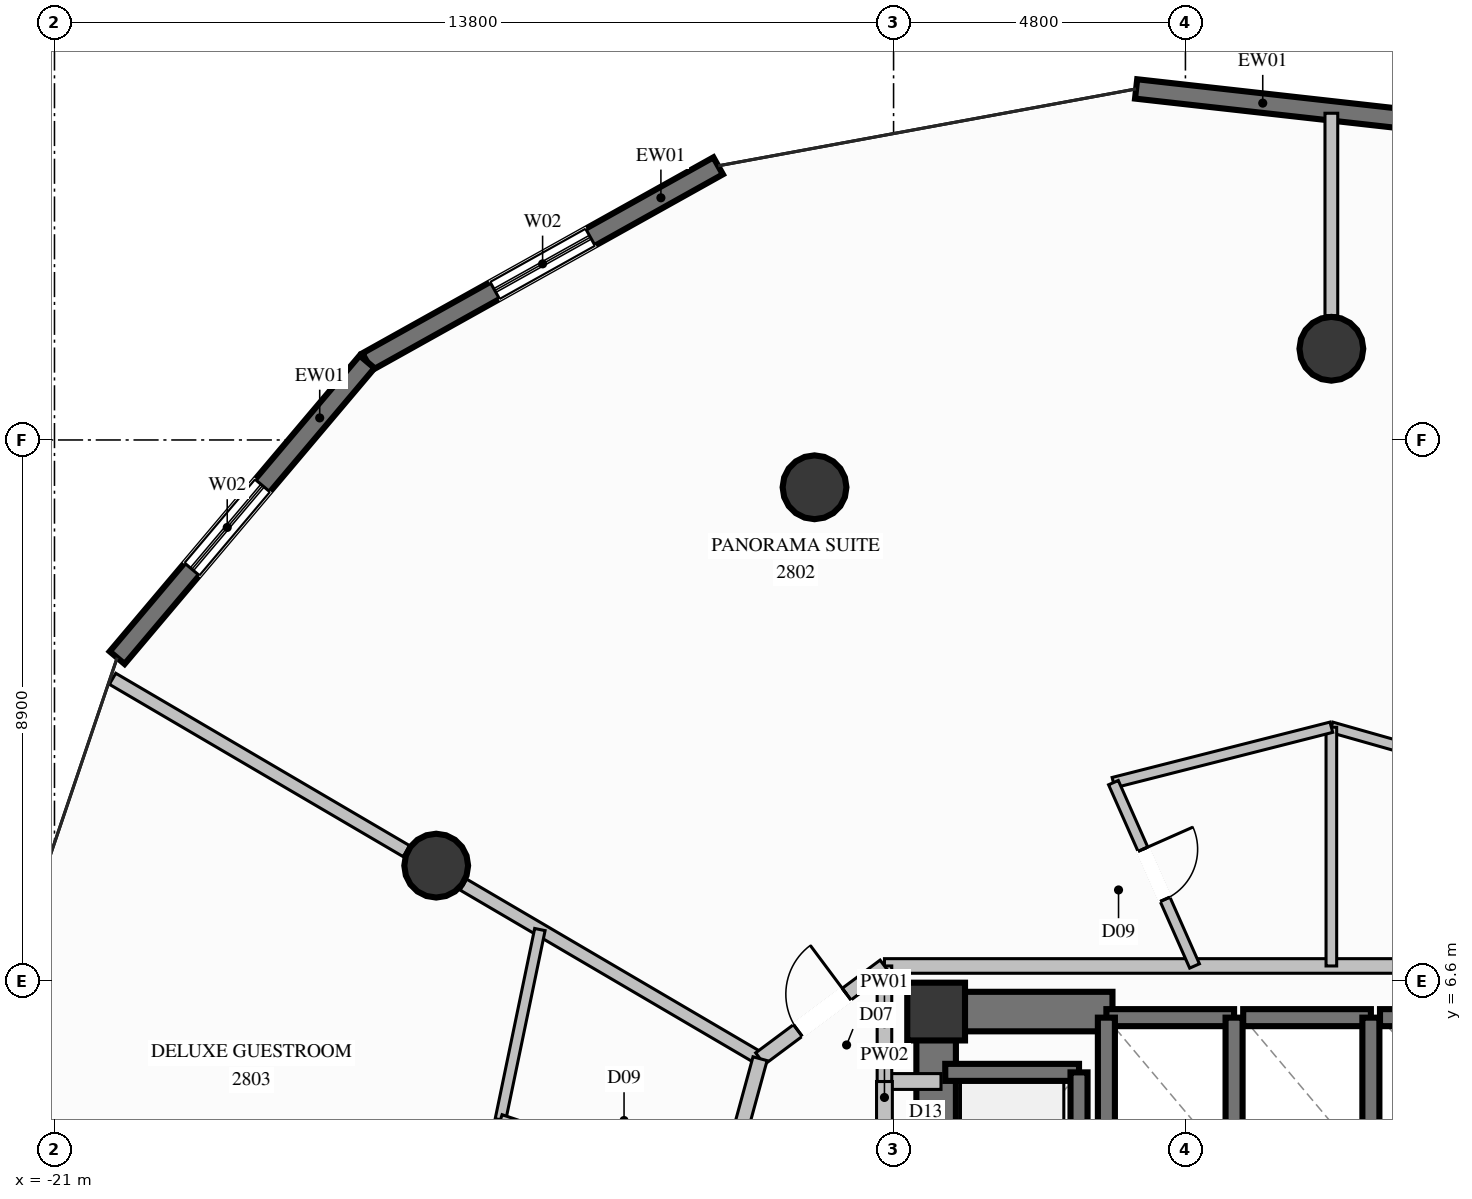
"""IFC4 building model, lengths in metres.
Left out: names, types, materials, properties, quantities, classifications, styles, units other than length and angle.
Written with IfcOpenShell. Run it as: python <this file> out.ifc"""

import sys

from ifc_helpers import new_model, si_unit, direction, frame, frame_2d, origin, origin_2d, place, context, subcontext, project, spatial, rectangle, circle, extrude, element, fill, save


model = new_model("IFC4")
c1 = context("Model", 3, precision=1e-05, world=origin(), true_north=direction((0.0, 1.0)))
c2 = subcontext(c1, "Body", "Model", "MODEL_VIEW")
j1 = project(units=[si_unit("LENGTHUNIT", "METRE"), si_unit("PLANEANGLEUNIT", "RADIAN")], contexts=[c1])
p1 = place(None, origin())
s1 = spatial("IfcSite", under=j1, at=p1, CompositionType="ELEMENT")
p2 = place(p1, origin())
s2 = spatial("IfcBuilding", under=s1, at=p2, CompositionType="ELEMENT")
p3 = place(p2, frame((0.0, 0.0, 106.2)))
s3 = spatial("IfcBuildingStorey", under=s2, at=p3, CompositionType="ELEMENT", Elevation=106.2)
p4 = place(p3, frame((-6.5, 6.1, 0.0), z_axis=(0.0, 0.0, 1.0), x_axis=(1.0, 0.0, 0.0)))
e1 = element("IfcColumn", 1, at=p4, inside=s3, PredefinedType="COLUMN", context=c2, shape_type="SweptSolid", body=[
    extrude(rectangle(XDim=0.95, YDim=0.95, at=origin_2d()), origin(), (0.0, 0.0, 1.0), 3.6),
])
p5 = place(p3, frame((-6.175, 6.1, 0.0), z_axis=(0.0, 0.0, 1.0), x_axis=(1.0, 0.0, 0.0)))
e2 = element("IfcWall", 2, at=p5, inside=s3, PredefinedType="SHEAR", context=c2, shape_type="SweptSolid", body=[
    extrude(rectangle(XDim=2.575, YDim=0.65, at=frame_2d((1.288, 0.0))), origin(), (0.0, 0.0, 1.0), 3.6),
])
p6 = place(p3, frame((-6.5, 2.35, 0.0), z_axis=(0.0, 0.0, 1.0), x_axis=(0.0, 1.0, 0.0)))
e3 = element("IfcWall", 3, at=p6, inside=s3, PredefinedType="SHEAR", context=c2, shape_type="SweptSolid", body=[
    extrude(rectangle(XDim=4.075, YDim=0.65, at=frame_2d((2.038, 0.0))), origin(), (0.0, 0.0, 1.0), 3.6),
])
for number, where, z_axis, x_axis in (
    (4, (0.0, 17.0, 0.0), (0.0, 0.0, 1.0), (1.0, 0.0, 0.0)),
    (5, (-8.5, 14.722, 0.0), (0.0, 0.0, 1.0), (1.0, 0.0, 0.0)),
    (6, (-14.722, 8.5, 0.0), (0.0, 0.0, 1.0), (1.0, 0.0, 0.0)),
):
    element("IfcColumn", number, at=place(p3, frame(where, z_axis=z_axis, x_axis=x_axis)), inside=s3, PredefinedType="COLUMN", context=c2, shape_type="SweptSolid", body=[
        extrude(circle(Radius=0.525, at=origin_2d()), origin(), (0.0, 0.0, 1.0), 3.6),
    ])
p7 = place(p3, frame((-3.211, 21.273, 0.0), z_axis=(0.0, 0.0, 1.0), x_axis=(0.993784044115, -0.111325081016, 0.0)))
e7 = element("IfcWall", 7, at=p7, inside=s3, PredefinedType="SOLIDWALL", context=c2, shape_type="SweptSolid", body=[
    extrude(rectangle(XDim=7.347, YDim=0.32, at=frame_2d((3.673, 0.0))), origin(), (0.0, 0.0, 1.0), 3.35),
])
p8 = place(p7, frame((4.441, 0.0, 0.35)))
e8 = element("IfcOpeningElement", 8, at=p8, cuts=e7, PredefinedType="OPENING", context=c2, shape_type="SweptSolid", body=[
    extrude(rectangle(XDim=1.8, YDim=2.6, at=frame_2d((0.9, 1.3))), frame((0.0, 0.17, 0.0), z_axis=(0.0, -1.0, 0.0), x_axis=(1.0, 0.0, 0.0)), (0.0, 0.0, 1.0), 0.34),
])
p9 = place(p3, frame((-15.859, 16.785, 0.0), z_axis=(0.0, 0.0, 1.0), x_axis=(0.873166276034, 0.487422459882, 0.0)))
e9 = element("IfcWall", 9, at=p9, inside=s3, PredefinedType="SOLIDWALL", context=c2, shape_type="SweptSolid", body=[
    extrude(rectangle(XDim=6.613, YDim=0.32, at=frame_2d((3.306, 0.0))), origin(), (0.0, 0.0, 1.0), 3.35),
])
p10 = place(p9, frame((2.406, 0.0, 0.35)))
e10 = element("IfcOpeningElement", 10, at=p10, cuts=e9, PredefinedType="OPENING", context=c2, shape_type="SweptSolid", body=[
    extrude(rectangle(XDim=1.8, YDim=2.6, at=frame_2d((0.9, 1.3))), frame((0.0, 0.17, 0.0), z_axis=(0.0, -1.0, 0.0), x_axis=(1.0, 0.0, 0.0)), (0.0, 0.0, 1.0), 0.34),
])
p11 = place(p3, frame((-19.969, 11.919, 0.0), z_axis=(0.0, 0.0, 1.0), x_axis=(0.645278763483, 0.763947195425, 0.0)))
e11 = element("IfcWall", 11, at=p11, inside=s3, PredefinedType="SOLIDWALL", context=c2, shape_type="SweptSolid", body=[
    extrude(rectangle(XDim=6.369, YDim=0.32, at=frame_2d((3.185, 0.0))), origin(), (0.0, 0.0, 1.0), 3.35),
])
p12 = place(p11, frame((1.905, 0.0, 0.35)))
e12 = element("IfcOpeningElement", 12, at=p12, cuts=e11, PredefinedType="OPENING", context=c2, shape_type="SweptSolid", body=[
    extrude(rectangle(XDim=1.8, YDim=2.6, at=frame_2d((0.9, 1.3))), frame((0.0, 0.17, 0.0), z_axis=(0.0, -1.0, 0.0), x_axis=(1.0, 0.0, 0.0)), (0.0, 0.0, 1.0), 0.34),
])
p13 = place(p3, frame((-1.6, 6.0, 0.0), z_axis=(0.0, 0.0, 1.0), x_axis=(-1.0, 0.0, 0.0)))
e13 = element("IfcWall", 13, at=p13, inside=s3, PredefinedType="SOLIDWALL", context=c2, shape_type="SweptSolid", body=[
    extrude(rectangle(XDim=2.1, YDim=0.28, at=frame_2d((1.05, 0.0))), origin(), (0.0, 0.0, 1.0), 3.35),
])
for number, where, z_axis, x_axis in (
    (14, (-3.7, 6.0, 0.0), (0.0, 0.0, 1.0), (0.0, -1.0, 0.0)),
    (15, (-1.6, 3.5, 0.0), (0.0, 0.0, 1.0), (0.0, 1.0, 0.0)),
):
    element("IfcWall", number, at=place(p3, frame(where, z_axis=z_axis, x_axis=x_axis)), inside=s3, PredefinedType="SOLIDWALL", context=c2, shape_type="SweptSolid", body=[
        extrude(rectangle(XDim=2.5, YDim=0.28, at=frame_2d((1.25, 0.0))), origin(), (0.0, 0.0, 1.0), 3.35),
    ])
p14 = place(p3, frame((0.65, 6.0, 0.0), z_axis=(0.0, 0.0, 1.0), x_axis=(-1.0, 0.0, 0.0)))
e16 = element("IfcWall", 16, at=p14, inside=s3, PredefinedType="SOLIDWALL", context=c2, shape_type="SweptSolid", body=[
    extrude(rectangle(XDim=2.1, YDim=0.28, at=frame_2d((1.05, 0.0))), origin(), (0.0, 0.0, 1.0), 3.35),
])
p15 = place(p3, frame((0.65, 3.5, 0.0), z_axis=(0.0, 0.0, 1.0), x_axis=(0.0, 1.0, 0.0)))
e17 = element("IfcWall", 17, at=p15, inside=s3, PredefinedType="SOLIDWALL", context=c2, shape_type="SweptSolid", body=[
    extrude(rectangle(XDim=2.5, YDim=0.28, at=frame_2d((1.25, 0.0))), origin(), (0.0, 0.0, 1.0), 3.35),
])
p16 = place(p3, frame((3.0, 6.0, 0.0), z_axis=(0.0, 0.0, 1.0), x_axis=(-1.0, 0.0, 0.0)))
e18 = element("IfcWall", 18, at=p16, inside=s3, PredefinedType="SOLIDWALL", context=c2, shape_type="SweptSolid", body=[
    extrude(rectangle(XDim=2.2, YDim=0.28, at=frame_2d((1.1, 0.0))), origin(), (0.0, 0.0, 1.0), 3.35),
])
p17 = place(p3, frame((-4.15, 5.1, 0.0), z_axis=(0.0, 0.0, 1.0), x_axis=(-1.0, 0.0, 0.0)))
e19 = element("IfcWall", 19, at=p17, inside=s3, PredefinedType="SOLIDWALL", context=c2, shape_type="SweptSolid", body=[
    extrude(rectangle(XDim=2.2, YDim=0.28, at=frame_2d((1.1, 0.0))), origin(), (0.0, 0.0, 1.0), 3.35),
])
p18 = place(p3, frame((-4.15, 2.4, 0.0), z_axis=(0.0, 0.0, 1.0), x_axis=(0.0, 1.0, 0.0)))
e20 = element("IfcWall", 20, at=p18, inside=s3, PredefinedType="SOLIDWALL", context=c2, shape_type="SweptSolid", body=[
    extrude(rectangle(XDim=2.7, YDim=0.28, at=frame_2d((1.35, 0.0))), origin(), (0.0, 0.0, 1.0), 3.35),
])
p19 = place(p3, frame((-7.35, 4.95, 0.0), z_axis=(0.0, 0.0, 1.0), x_axis=(1.0, 0.0, 0.0)))
e21 = element("IfcWall", 21, at=p19, inside=s3, PredefinedType="PARTITIONING", context=c2, shape_type="SweptSolid", body=[
    extrude(rectangle(XDim=0.93, YDim=0.26, at=frame_2d((0.465, 0.0))), origin(), (0.0, 0.0, 1.0), 3.35),
])
p20 = place(p3, frame((-7.35, 2.55, 0.0), z_axis=(0.0, 0.0, 1.0), x_axis=(0.0, 1.0, 0.0)))
e22 = element("IfcWall", 22, at=p20, inside=s3, PredefinedType="PARTITIONING", context=c2, shape_type="SweptSolid", body=[
    extrude(rectangle(XDim=2.4, YDim=0.26, at=frame_2d((1.2, 0.0))), origin(), (0.0, 0.0, 1.0), 2.435),
])
p21 = place(p20, frame((0.775, 0.0, 0.0)))
e23 = element("IfcOpeningElement", 23, at=p21, cuts=e22, PredefinedType="OPENING", context=c2, shape_type="SweptSolid", body=[
    extrude(rectangle(XDim=0.85, YDim=2.05, at=frame_2d((0.425, 1.025))), frame((0.0, 0.14, 0.0), z_axis=(0.0, -1.0, 0.0), x_axis=(1.0, 0.0, 0.0)), (0.0, 0.0, 1.0), 0.28),
])
p22 = place(p3, frame((-7.35, 6.85, 0.0), z_axis=(0.0, 0.0, 1.0), x_axis=(1.0, 0.0, 0.0)))
e24 = element("IfcWall", 24, at=p22, inside=s3, PredefinedType="PARTITIONING", context=c2, shape_type="SweptSolid", body=[
    extrude(rectangle(XDim=14.7, YDim=0.24, at=frame_2d((7.35, 0.0))), origin(), (0.0, 0.0, 1.0), 2.435),
])
p23 = place(p3, frame((-7.35, 4.95, 0.0), z_axis=(0.0, 0.0, 1.0), x_axis=(0.0, 1.0, 0.0)))
e25 = element("IfcWall", 25, at=p23, inside=s3, PredefinedType="PARTITIONING", context=c2, shape_type="SweptSolid", body=[
    extrude(rectangle(XDim=1.9, YDim=0.24, at=frame_2d((0.95, 0.0))), origin(), (0.0, 0.0, 1.0), 2.435),
])
p24 = place(p3, frame((-9.396, 5.325, 0.0), z_axis=(0.0, 0.0, 1.0), x_axis=(-0.862467386777, 0.50611264235, 0.0)))
e26 = element("IfcWall", 26, at=p24, inside=s3, PredefinedType="PARTITIONING", context=c2, shape_type="SweptSolid", body=[
    extrude(rectangle(XDim=5.657, YDim=0.21, at=frame_2d((2.829, 0.0))), origin(), (0.0, 0.0, 1.0), 2.719),
])
p25 = place(p3, frame((-15.212, 8.738, 0.0), z_axis=(0.0, 0.0, 1.0), x_axis=(-0.862556345738, 0.505961016706, 0.0)))
e27 = element("IfcWall", 27, at=p25, inside=s3, PredefinedType="PARTITIONING", context=c2, shape_type="SweptSolid", body=[
    extrude(rectangle(XDim=5.603, YDim=0.21, at=frame_2d((2.802, 0.0))), origin(), (0.0, 0.0, 1.0), 3.35),
])
p26 = place(p3, frame((0.0, 10.776, 0.0), z_axis=(0.0, 0.0, 1.0), x_axis=(0.962140957865, -0.272552338459, 0.0)))
e28 = element("IfcWall", 28, at=p26, inside=s3, PredefinedType="PLUMBINGWALL", context=c2, shape_type="SweptSolid", body=[
    extrude(rectangle(XDim=3.599, YDim=0.175, at=frame_2d((1.8, 0.0))), origin(), (0.0, 0.0, 1.0), 2.985),
])
p27 = place(p3, frame((0.0, 10.776, 0.0), z_axis=(0.0, 0.0, 1.0), x_axis=(0.0, -1.0, 0.0)))
e29 = element("IfcWall", 29, at=p27, inside=s3, PredefinedType="PLUMBINGWALL", context=c2, shape_type="SweptSolid", body=[
    extrude(rectangle(XDim=3.926, YDim=0.175, at=frame_2d((1.963, 0.0))), origin(), (0.0, 0.0, 1.0), 3.35),
])
p28 = place(p3, frame((0.0, 17.545, 0.0), z_axis=(0.0, 0.0, 1.0), x_axis=(0.0, 1.0, 0.0)))
e30 = element("IfcWall", 30, at=p28, inside=s3, PredefinedType="PARTITIONING", context=c2, shape_type="SweptSolid", body=[
    extrude(rectangle(XDim=3.328, YDim=0.21, at=frame_2d((1.664, 0.0))), origin(), (0.0, 0.0, 1.0), 3.35),
])
p29 = place(p3, frame((-3.584, 9.865, 0.0), z_axis=(0.0, 0.0, 1.0), x_axis=(0.969187500781, 0.246324152957, 0.0)))
e31 = element("IfcWall", 31, at=p29, inside=s3, PredefinedType="PLUMBINGWALL", context=c2, shape_type="SweptSolid", body=[
    extrude(rectangle(XDim=3.698, YDim=0.175, at=frame_2d((1.849, 0.0))), origin(), (0.0, 0.0, 1.0), 2.985),
])
p30 = place(p3, frame((-3.584, 9.865, 0.0), z_axis=(0.0, 0.0, 1.0), x_axis=(0.404626310395, -0.914482120621, 0.0)))
e32 = element("IfcWall", 32, at=p30, inside=s3, PredefinedType="PLUMBINGWALL", context=c2, shape_type="SweptSolid", body=[
    extrude(rectangle(XDim=3.297, YDim=0.175, at=frame_2d((1.648, 0.0))), origin(), (0.0, 0.0, 1.0), 3.35),
])
p31 = place(p30, frame((1.198, 0.0, 0.0)))
e33 = element("IfcOpeningElement", 33, at=p31, cuts=e32, PredefinedType="OPENING", context=c2, shape_type="SweptSolid", body=[
    extrude(rectangle(XDim=0.9, YDim=2.1, at=frame_2d((0.45, 1.05))), frame((0.0, 0.098, 0.0), z_axis=(0.0, -1.0, 0.0), x_axis=(1.0, 0.0, 0.0)), (0.0, 0.0, 1.0), 0.195),
])
p32 = place(p3, frame((-9.396, 5.325, 0.0), z_axis=(0.0, 0.0, 1.0), x_axis=(0.8017416961, 0.597670689205, 0.0)))
e34 = element("IfcWall", 34, at=p32, inside=s3, PredefinedType="PARTITIONING", context=c2, shape_type="SweptSolid", body=[
    extrude(rectangle(XDim=2.552, YDim=0.24, at=frame_2d((1.276, 0.0))), origin(), (0.0, 0.0, 1.0), 3.35),
])
p33 = place(p32, frame((0.776, 0.0, 0.0)))
e35 = element("IfcOpeningElement", 35, at=p33, cuts=e34, PredefinedType="OPENING", context=c2, shape_type="SweptSolid", body=[
    extrude(rectangle(XDim=1.0, YDim=2.2, at=frame_2d((0.5, 1.1))), frame((0.0, 0.13, 0.0), z_axis=(0.0, -1.0, 0.0), x_axis=(1.0, 0.0, 0.0)), (0.0, 0.0, 1.0), 0.26),
])
p34 = place(p3, frame((-9.396, 5.325, 0.0), z_axis=(0.0, 0.0, 1.0), x_axis=(-0.263643210908, -0.964620265878, 0.0)))
e36 = element("IfcWall", 36, at=p34, inside=s3, PredefinedType="PARTITIONING", context=c2, shape_type="SweptSolid", body=[
    extrude(rectangle(XDim=2.318, YDim=0.24, at=frame_2d((1.159, 0.0))), origin(), (0.0, 0.0, 1.0), 3.35),
])
p35 = place(p3, frame((-13.017, 7.449, 0.0), z_axis=(0.0, 0.0, 1.0), x_axis=(-0.203136275653, -0.979150475419, 0.0)))
e37 = element("IfcWall", 37, at=p35, inside=s3, PredefinedType="PLUMBINGWALL", context=c2, shape_type="SweptSolid", body=[
    extrude(rectangle(XDim=3.195, YDim=0.175, at=frame_2d((1.597, 0.0))), origin(), (0.0, 0.0, 1.0), 3.35),
])
p36 = place(p3, frame((-10.007, 3.089, 0.0), z_axis=(0.0, 0.0, 1.0), x_axis=(-0.947724103288, 0.319090933822, 0.0)))
e38 = element("IfcWall", 38, at=p36, inside=s3, PredefinedType="PLUMBINGWALL", context=c2, shape_type="SweptSolid", body=[
    extrude(rectangle(XDim=3.861, YDim=0.175, at=frame_2d((1.93, 0.0))), origin(), (0.0, 0.0, 1.0), 3.35),
])
p37 = place(p36, frame((1.48, 0.0, 0.0)))
e39 = element("IfcOpeningElement", 39, at=p37, cuts=e38, PredefinedType="OPENING", context=c2, shape_type="SweptSolid", body=[
    extrude(rectangle(XDim=0.9, YDim=2.1, at=frame_2d((0.45, 1.05))), frame((0.0, 0.098, 0.0), z_axis=(0.0, -1.0, 0.0), x_axis=(1.0, 0.0, 0.0)), (0.0, 0.0, 1.0), 0.195),
])
p38 = place(p10, origin())
e40 = element("IfcWindow", 40, at=p38, inside=s3, PartitioningType="SINGLE_PANEL", PredefinedType="WINDOW", context=c2, shape_type="SweptSolid", body=[
    extrude(rectangle(XDim=1.8, YDim=2.6, at=frame_2d((0.9, 1.3))), frame((0.0, 0.03, 0.0), z_axis=(0.0, -1.0, 0.0), x_axis=(1.0, 0.0, 0.0)), (0.0, 0.0, 1.0), 0.06),
])
fill(e10, e40)
p39 = place(p12, origin())
e41 = element("IfcWindow", 41, at=p39, inside=s3, PartitioningType="SINGLE_PANEL", PredefinedType="WINDOW", context=c2, shape_type="SweptSolid", body=[
    extrude(rectangle(XDim=1.8, YDim=2.6, at=frame_2d((0.9, 1.3))), frame((0.0, 0.03, 0.0), z_axis=(0.0, -1.0, 0.0), x_axis=(1.0, 0.0, 0.0)), (0.0, 0.0, 1.0), 0.06),
])
fill(e12, e41)
p40 = place(p31, origin())
e42 = element("IfcDoor", 42, at=p40, inside=s3, OperationType="SINGLE_SWING_LEFT", PredefinedType="DOOR", context=c2, shape_type="SweptSolid", body=[
    extrude(rectangle(XDim=0.9, YDim=2.1, at=frame_2d((0.45, 1.05))), frame((0.0, 0.025, 0.0), z_axis=(0.0, -1.0, 0.0), x_axis=(1.0, 0.0, 0.0)), (0.0, 0.0, 1.0), 0.05),
])
fill(e33, e42)
p41 = place(p33, origin())
e43 = element("IfcDoor", 43, at=p41, inside=s3, OperationType="SINGLE_SWING_RIGHT", PredefinedType="DOOR", context=c2, shape_type="SweptSolid", body=[
    extrude(rectangle(XDim=1.0, YDim=2.2, at=frame_2d((0.5, 1.1))), frame((0.0, 0.025, 0.0), z_axis=(0.0, -1.0, 0.0), x_axis=(1.0, 0.0, 0.0)), (0.0, 0.0, 1.0), 0.05),
])
fill(e35, e43)
save(model, sys.argv[1])
